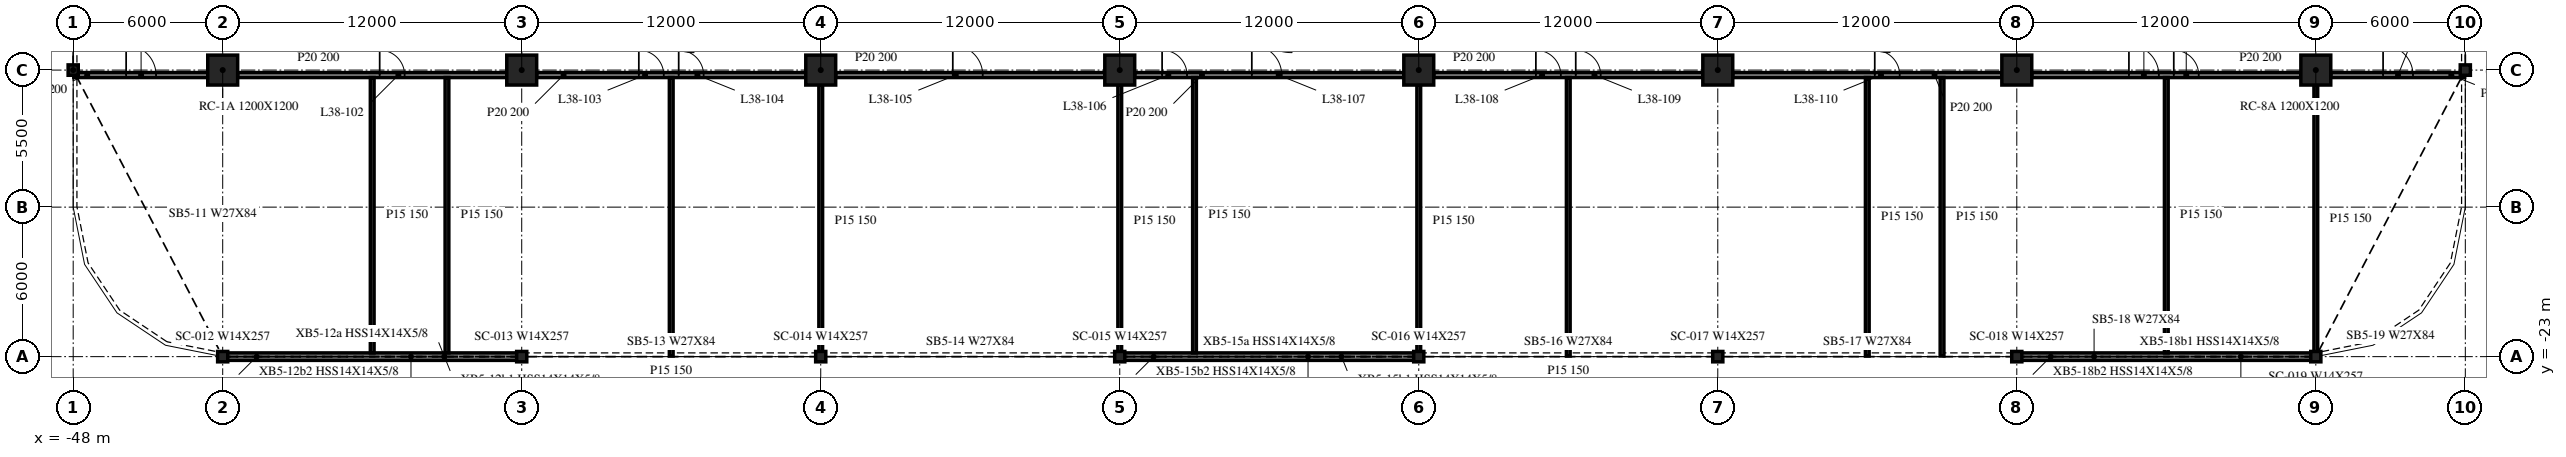
"""IFC4 building model, lengths in metres.
Left out: names, types, materials, properties, quantities, classifications, styles, units other than length and angle.
Written with IfcOpenShell. Run it as: python <this file> out.ifc"""

import sys

from ifc_helpers import new_model, si_unit, direction, frame, frame_2d, origin, origin_2d, place, context, subcontext, project, spatial, rectangle, i_section, extrude, element, fill, save


model = new_model("IFC4")
c1 = context("Model", 3, precision=1e-05, world=origin(), true_north=direction((0.0, 1.0)))
c2 = subcontext(c1, "Body", "Model", "MODEL_VIEW")
j1 = project(units=[si_unit("LENGTHUNIT", "METRE"), si_unit("PLANEANGLEUNIT", "RADIAN")], contexts=[c1])
p1 = place(None, origin())
s1 = spatial("IfcSite", under=j1, at=p1, CompositionType="ELEMENT")
p2 = place(p1, origin())
s2 = spatial("IfcBuilding", under=s1, at=p2, CompositionType="ELEMENT")
p3 = place(p2, frame((0.0, 0.0, 163.0)))
s3 = spatial("IfcBuildingStorey", under=s2, at=p3, CompositionType="ELEMENT", Elevation=163.0)
for number, where, z_axis, x_axis in (
    (1, (-42.0, -11.5, -0.34), (0.0, 0.0, 1.0), (1.0, 0.0, 0.0)),
    (2, (-30.0, -11.5, -0.34), (0.0, 0.0, 1.0), (1.0, 0.0, 0.0)),
    (3, (-18.0, -11.5, -0.34), (0.0, 0.0, 1.0), (1.0, 0.0, 0.0)),
    (4, (-6.0, -11.5, -0.34), (0.0, 0.0, 1.0), (1.0, 0.0, 0.0)),
    (5, (6.0, -11.5, -0.34), (0.0, 0.0, 1.0), (1.0, 0.0, 0.0)),
    (6, (18.0, -11.5, -0.34), (0.0, 0.0, 1.0), (1.0, 0.0, 0.0)),
    (7, (30.0, -11.5, -0.34), (0.0, 0.0, 1.0), (1.0, 0.0, 0.0)),
    (8, (42.0, -11.5, -0.34), (0.0, 0.0, 1.0), (1.0, 0.0, 0.0)),
):
    element("IfcColumn", number, at=place(p3, frame(where, z_axis=z_axis, x_axis=x_axis)), inside=s3, PredefinedType="COLUMN", context=c2, shape_type="SweptSolid", body=[
        extrude(rectangle(XDim=1.2, YDim=1.2, at=origin_2d()), origin(), (0.0, 0.0, 1.0), 3.8),
    ])
for number, where, z_axis, x_axis in (
    (9, (-48.0, -11.5, -0.34), (0.0, 0.0, 1.0), (1.0, 0.0, 0.0)),
    (10, (-42.0, -23.0, -0.34), (0.0, 0.0, 1.0), (1.0, 0.0, 0.0)),
    (11, (-30.0, -23.0, -0.34), (0.0, 0.0, 1.0), (1.0, 0.0, 0.0)),
    (12, (-18.0, -23.0, -0.34), (0.0, 0.0, 1.0), (1.0, 0.0, 0.0)),
    (13, (-6.0, -23.0, -0.34), (0.0, 0.0, 1.0), (1.0, 0.0, 0.0)),
    (14, (6.0, -23.0, -0.34), (0.0, 0.0, 1.0), (1.0, 0.0, 0.0)),
    (15, (18.0, -23.0, -0.34), (0.0, 0.0, 1.0), (1.0, 0.0, 0.0)),
    (16, (30.0, -23.0, -0.34), (0.0, 0.0, 1.0), (1.0, 0.0, 0.0)),
    (17, (42.0, -23.0, -0.34), (0.0, 0.0, 1.0), (1.0, 0.0, 0.0)),
    (18, (48.0, -11.5, -0.34), (0.0, 0.0, 1.0), (1.0, 0.0, 0.0)),
):
    element("IfcColumn", number, at=place(p3, frame(where, z_axis=z_axis, x_axis=x_axis)), inside=s3, PredefinedType="COLUMN", context=c2, shape_type="SweptSolid", body=[
        extrude(i_section(OverallWidth=0.406, OverallDepth=0.417, WebThickness=0.03, FlangeThickness=0.048, at=origin_2d()), origin(), (0.0, 0.0, 1.0), 3.8),
    ])
for number, where, z_axis, x_axis in (
    (19, (-41.985, -23.0, 0.0), (0.0, 0.0, 1.0), (1.0, 0.0, 0.0)),
    (20, (-5.985, -23.0, 0.0), (0.0, 0.0, 1.0), (1.0, 0.0, 0.0)),
    (21, (30.015, -23.0, 0.0), (0.0, 0.0, 1.0), (1.0, 0.0, 0.0)),
):
    element("IfcWall", number, at=place(p3, frame(where, z_axis=z_axis, x_axis=x_axis)), inside=s3, PredefinedType="NOTDEFINED", context=c2, shape_type="SweptSolid", body=[
        extrude(rectangle(XDim=11.97, YDim=0.3, at=frame_2d((5.985, 0.0))), origin(), (0.0, 0.0, 1.0), 2.782),
    ])
p4 = place(p3, frame((-47.975, -11.7, 0.0), z_axis=(0.0, 0.0, 1.0), x_axis=(1.0, 0.0, 0.0)))
e22 = element("IfcWall", 22, at=p4, inside=s3, PredefinedType="PARTITIONING", context=c2, shape_type="SweptSolid", body=[
    extrude(rectangle(XDim=5.375, YDim=0.2, at=frame_2d((2.688, 0.0))), origin(), (0.0, 0.0, 1.0), 3.46),
])
p5 = place(p4, frame((2.1, 0.0, 0.0)))
e23 = element("IfcOpeningElement", 23, at=p5, cuts=e22, PredefinedType="OPENING", context=c2, shape_type="SweptSolid", body=[
    extrude(rectangle(XDim=1.2, YDim=2.1, at=frame_2d((0.6, 1.05))), frame((0.0, 0.11, 0.0), z_axis=(0.0, -1.0, 0.0), x_axis=(1.0, 0.0, 0.0)), (0.0, 0.0, 1.0), 0.22),
])
p6 = place(p3, frame((-41.4, -11.7, 0.0), z_axis=(0.0, 0.0, 1.0), x_axis=(1.0, 0.0, 0.0)))
e24 = element("IfcWall", 24, at=p6, inside=s3, PredefinedType="PARTITIONING", context=c2, shape_type="SweptSolid", body=[
    extrude(rectangle(XDim=10.8, YDim=0.2, at=frame_2d((5.4, 0.0))), origin(), (0.0, 0.0, 1.0), 3.46),
])
p7 = place(p6, frame((5.7, 0.0, 0.0)))
e25 = element("IfcOpeningElement", 25, at=p7, cuts=e24, PredefinedType="OPENING", context=c2, shape_type="SweptSolid", body=[
    extrude(rectangle(XDim=1.0, YDim=2.1, at=frame_2d((0.5, 1.05))), frame((0.0, 0.11, 0.0), z_axis=(0.0, -1.0, 0.0), x_axis=(1.0, 0.0, 0.0)), (0.0, 0.0, 1.0), 0.22),
])
p8 = place(p3, frame((-29.4, -11.7, 0.0), z_axis=(0.0, 0.0, 1.0), x_axis=(1.0, 0.0, 0.0)))
e26 = element("IfcWall", 26, at=p8, inside=s3, PredefinedType="PARTITIONING", context=c2, shape_type="SweptSolid", body=[
    extrude(rectangle(XDim=10.8, YDim=0.2, at=frame_2d((5.4, 0.0))), origin(), (0.0, 0.0, 1.0), 3.46),
])
p9 = place(p8, frame((4.1, 0.0, 0.0)))
e27 = element("IfcOpeningElement", 27, at=p9, cuts=e26, PredefinedType="OPENING", context=c2, shape_type="SweptSolid", body=[
    extrude(rectangle(XDim=1.0, YDim=2.1, at=frame_2d((0.5, 1.05))), frame((0.0, 0.11, 0.0), z_axis=(0.0, -1.0, 0.0), x_axis=(1.0, 0.0, 0.0)), (0.0, 0.0, 1.0), 0.22),
])
p10 = place(p8, frame((5.7, 0.0, 0.0)))
e28 = element("IfcOpeningElement", 28, at=p10, cuts=e26, PredefinedType="OPENING", context=c2, shape_type="SweptSolid", body=[
    extrude(rectangle(XDim=1.0, YDim=2.1, at=frame_2d((0.5, 1.05))), frame((0.0, 0.11, 0.0), z_axis=(0.0, -1.0, 0.0), x_axis=(1.0, 0.0, 0.0)), (0.0, 0.0, 1.0), 0.22),
])
p11 = place(p3, frame((-17.4, -11.7, 0.0), z_axis=(0.0, 0.0, 1.0), x_axis=(1.0, 0.0, 0.0)))
e29 = element("IfcWall", 29, at=p11, inside=s3, PredefinedType="PARTITIONING", context=c2, shape_type="SweptSolid", body=[
    extrude(rectangle(XDim=10.8, YDim=0.2, at=frame_2d((5.4, 0.0))), origin(), (0.0, 0.0, 1.0), 3.46),
])
p12 = place(p11, frame((4.7, 0.0, 0.0)))
e30 = element("IfcOpeningElement", 30, at=p12, cuts=e29, PredefinedType="OPENING", context=c2, shape_type="SweptSolid", body=[
    extrude(rectangle(XDim=1.2, YDim=2.1, at=frame_2d((0.6, 1.05))), frame((0.0, 0.11, 0.0), z_axis=(0.0, -1.0, 0.0), x_axis=(1.0, 0.0, 0.0)), (0.0, 0.0, 1.0), 0.22),
])
p13 = place(p3, frame((-5.4, -11.7, 0.0), z_axis=(0.0, 0.0, 1.0), x_axis=(1.0, 0.0, 0.0)))
e31 = element("IfcWall", 31, at=p13, inside=s3, PredefinedType="PARTITIONING", context=c2, shape_type="SweptSolid", body=[
    extrude(rectangle(XDim=10.8, YDim=0.2, at=frame_2d((5.4, 0.0))), origin(), (0.0, 0.0, 1.0), 3.46),
])
p14 = place(p13, frame((1.1, 0.0, 0.0)))
e32 = element("IfcOpeningElement", 32, at=p14, cuts=e31, PredefinedType="OPENING", context=c2, shape_type="SweptSolid", body=[
    extrude(rectangle(XDim=1.0, YDim=2.1, at=frame_2d((0.5, 1.05))), frame((0.0, 0.11, 0.0), z_axis=(0.0, -1.0, 0.0), x_axis=(1.0, 0.0, 0.0)), (0.0, 0.0, 1.0), 0.22),
])
p15 = place(p13, frame((4.7, 0.0, 0.0)))
e33 = element("IfcOpeningElement", 33, at=p15, cuts=e31, PredefinedType="OPENING", context=c2, shape_type="SweptSolid", body=[
    extrude(rectangle(XDim=1.2, YDim=2.1, at=frame_2d((0.6, 1.05))), frame((0.0, 0.11, 0.0), z_axis=(0.0, -1.0, 0.0), x_axis=(1.0, 0.0, 0.0)), (0.0, 0.0, 1.0), 0.22),
])
p16 = place(p3, frame((6.6, -11.7, 0.0), z_axis=(0.0, 0.0, 1.0), x_axis=(1.0, 0.0, 0.0)))
e34 = element("IfcWall", 34, at=p16, inside=s3, PredefinedType="PARTITIONING", context=c2, shape_type="SweptSolid", body=[
    extrude(rectangle(XDim=10.8, YDim=0.2, at=frame_2d((5.4, 0.0))), origin(), (0.0, 0.0, 1.0), 3.46),
])
p17 = place(p16, frame((4.1, 0.0, 0.0)))
e35 = element("IfcOpeningElement", 35, at=p17, cuts=e34, PredefinedType="OPENING", context=c2, shape_type="SweptSolid", body=[
    extrude(rectangle(XDim=1.0, YDim=2.1, at=frame_2d((0.5, 1.05))), frame((0.0, 0.11, 0.0), z_axis=(0.0, -1.0, 0.0), x_axis=(1.0, 0.0, 0.0)), (0.0, 0.0, 1.0), 0.22),
])
p18 = place(p16, frame((5.7, 0.0, 0.0)))
e36 = element("IfcOpeningElement", 36, at=p18, cuts=e34, PredefinedType="OPENING", context=c2, shape_type="SweptSolid", body=[
    extrude(rectangle(XDim=1.0, YDim=2.1, at=frame_2d((0.5, 1.05))), frame((0.0, 0.11, 0.0), z_axis=(0.0, -1.0, 0.0), x_axis=(1.0, 0.0, 0.0)), (0.0, 0.0, 1.0), 0.22),
])
p19 = place(p3, frame((18.6, -11.7, 0.0), z_axis=(0.0, 0.0, 1.0), x_axis=(1.0, 0.0, 0.0)))
e37 = element("IfcWall", 37, at=p19, inside=s3, PredefinedType="PARTITIONING", context=c2, shape_type="SweptSolid", body=[
    extrude(rectangle(XDim=10.8, YDim=0.2, at=frame_2d((5.4, 0.0))), origin(), (0.0, 0.0, 1.0), 3.46),
])
p20 = place(p19, frame((5.7, 0.0, 0.0)))
e38 = element("IfcOpeningElement", 38, at=p20, cuts=e37, PredefinedType="OPENING", context=c2, shape_type="SweptSolid", body=[
    extrude(rectangle(XDim=1.0, YDim=2.1, at=frame_2d((0.5, 1.05))), frame((0.0, 0.11, 0.0), z_axis=(0.0, -1.0, 0.0), x_axis=(1.0, 0.0, 0.0)), (0.0, 0.0, 1.0), 0.22),
])
p21 = place(p3, frame((30.6, -11.7, 0.0), z_axis=(0.0, 0.0, 1.0), x_axis=(1.0, 0.0, 0.0)))
e39 = element("IfcWall", 39, at=p21, inside=s3, PredefinedType="PARTITIONING", context=c2, shape_type="SweptSolid", body=[
    extrude(rectangle(XDim=10.8, YDim=0.2, at=frame_2d((5.4, 0.0))), origin(), (0.0, 0.0, 1.0), 3.46),
])
p22 = place(p21, frame((3.9, 0.0, 0.0)))
e40 = element("IfcOpeningElement", 40, at=p22, cuts=e39, PredefinedType="OPENING", context=c2, shape_type="SweptSolid", body=[
    extrude(rectangle(XDim=1.2, YDim=2.1, at=frame_2d((0.6, 1.05))), frame((0.0, 0.11, 0.0), z_axis=(0.0, -1.0, 0.0), x_axis=(1.0, 0.0, 0.0)), (0.0, 0.0, 1.0), 0.22),
])
p23 = place(p21, frame((5.7, 0.0, 0.0)))
e41 = element("IfcOpeningElement", 41, at=p23, cuts=e39, PredefinedType="OPENING", context=c2, shape_type="SweptSolid", body=[
    extrude(rectangle(XDim=1.0, YDim=2.1, at=frame_2d((0.5, 1.05))), frame((0.0, 0.11, 0.0), z_axis=(0.0, -1.0, 0.0), x_axis=(1.0, 0.0, 0.0)), (0.0, 0.0, 1.0), 0.22),
])
p24 = place(p3, frame((42.6, -11.7, 0.0), z_axis=(0.0, 0.0, 1.0), x_axis=(1.0, 0.0, 0.0)))
e42 = element("IfcWall", 42, at=p24, inside=s3, PredefinedType="PARTITIONING", context=c2, shape_type="SweptSolid", body=[
    extrude(rectangle(XDim=5.375, YDim=0.2, at=frame_2d((2.688, 0.0))), origin(), (0.0, 0.0, 1.0), 3.46),
])
p25 = place(p24, frame((2.1, 0.0, 0.0)))
e43 = element("IfcOpeningElement", 43, at=p25, cuts=e42, PredefinedType="OPENING", context=c2, shape_type="SweptSolid", body=[
    extrude(rectangle(XDim=1.2, YDim=2.1, at=frame_2d((0.6, 1.05))), frame((0.0, 0.11, 0.0), z_axis=(0.0, -1.0, 0.0), x_axis=(1.0, 0.0, 0.0)), (0.0, 0.0, 1.0), 0.22),
])
for number, where, z_axis, x_axis in (
    (44, (-36.0, -22.85, 0.0), (0.0, 0.0, 1.0), (0.0, 1.0, 0.0)),
    (45, (-33.0, -22.85, 0.0), (0.0, 0.0, 1.0), (0.0, 1.0, 0.0)),
):
    element("IfcWall", number, at=place(p3, frame(where, z_axis=z_axis, x_axis=x_axis)), inside=s3, PredefinedType="PARTITIONING", context=c2, shape_type="SweptSolid", body=[
        extrude(rectangle(XDim=11.05, YDim=0.15, at=frame_2d((5.525, 0.0))), origin(), (0.0, 0.0, 1.0), 3.46),
    ])
p26 = place(p3, frame((-24.0, -22.975, 0.0), z_axis=(0.0, 0.0, 1.0), x_axis=(0.0, 1.0, 0.0)))
e46 = element("IfcWall", 46, at=p26, inside=s3, PredefinedType="PARTITIONING", context=c2, shape_type="SweptSolid", body=[
    extrude(rectangle(XDim=11.175, YDim=0.15, at=frame_2d((5.587, 0.0))), origin(), (0.0, 0.0, 1.0), 3.46),
])
for number, where, z_axis, x_axis in (
    (47, (-18.0, -22.975, 0.0), (0.0, 0.0, 1.0), (0.0, 1.0, 0.0)),
    (48, (-6.0, -22.975, 0.0), (0.0, 0.0, 1.0), (0.0, 1.0, 0.0)),
):
    element("IfcWall", number, at=place(p3, frame(where, z_axis=z_axis, x_axis=x_axis)), inside=s3, PredefinedType="PARTITIONING", context=c2, shape_type="SweptSolid", body=[
        extrude(rectangle(XDim=10.875, YDim=0.15, at=frame_2d((5.438, 0.0))), origin(), (0.0, 0.0, 1.0), 3.46),
    ])
p27 = place(p3, frame((-3.0, -22.85, 0.0), z_axis=(0.0, 0.0, 1.0), x_axis=(0.0, 1.0, 0.0)))
e49 = element("IfcWall", 49, at=p27, inside=s3, PredefinedType="PARTITIONING", context=c2, shape_type="SweptSolid", body=[
    extrude(rectangle(XDim=11.05, YDim=0.15, at=frame_2d((5.525, 0.0))), origin(), (0.0, 0.0, 1.0), 3.46),
])
p28 = place(p3, frame((6.0, -22.975, 0.0), z_axis=(0.0, 0.0, 1.0), x_axis=(0.0, 1.0, 0.0)))
e50 = element("IfcWall", 50, at=p28, inside=s3, PredefinedType="PARTITIONING", context=c2, shape_type="SweptSolid", body=[
    extrude(rectangle(XDim=10.875, YDim=0.15, at=frame_2d((5.438, 0.0))), origin(), (0.0, 0.0, 1.0), 3.46),
])
for number, where, z_axis, x_axis in (
    (51, (12.0, -22.975, 0.0), (0.0, 0.0, 1.0), (0.0, 1.0, 0.0)),
    (52, (24.0, -22.975, 0.0), (0.0, 0.0, 1.0), (0.0, 1.0, 0.0)),
    (53, (27.0, -22.975, 0.0), (0.0, 0.0, 1.0), (0.0, 1.0, 0.0)),
):
    element("IfcWall", number, at=place(p3, frame(where, z_axis=z_axis, x_axis=x_axis)), inside=s3, PredefinedType="PARTITIONING", context=c2, shape_type="SweptSolid", body=[
        extrude(rectangle(XDim=11.175, YDim=0.15, at=frame_2d((5.587, 0.0))), origin(), (0.0, 0.0, 1.0), 3.46),
    ])
p29 = place(p3, frame((36.0, -22.85, 0.0), z_axis=(0.0, 0.0, 1.0), x_axis=(0.0, 1.0, 0.0)))
e54 = element("IfcWall", 54, at=p29, inside=s3, PredefinedType="PARTITIONING", context=c2, shape_type="SweptSolid", body=[
    extrude(rectangle(XDim=11.05, YDim=0.15, at=frame_2d((5.525, 0.0))), origin(), (0.0, 0.0, 1.0), 3.46),
])
p30 = place(p3, frame((42.0, -22.847, 0.0), z_axis=(0.0, 0.0, 1.0), x_axis=(0.0, 1.0, 0.0)))
e55 = element("IfcWall", 55, at=p30, inside=s3, PredefinedType="PARTITIONING", context=c2, shape_type="SweptSolid", body=[
    extrude(rectangle(XDim=10.747, YDim=0.15, at=frame_2d((5.374, 0.0))), origin(), (0.0, 0.0, 1.0), 3.46),
])
p31 = place(p5, origin())
e56 = element("IfcDoor", 56, at=p31, inside=s3, OperationType="SINGLE_SWING_LEFT", PredefinedType="DOOR", context=c2, shape_type="SweptSolid", body=[
    extrude(rectangle(XDim=1.2, YDim=2.1, at=frame_2d((0.6, 1.05))), frame((0.0, 0.025, 0.0), z_axis=(0.0, -1.0, 0.0), x_axis=(1.0, 0.0, 0.0)), (0.0, 0.0, 1.0), 0.05),
])
fill(e23, e56)
p32 = place(p7, origin())
e57 = element("IfcDoor", 57, at=p32, inside=s3, OperationType="SINGLE_SWING_LEFT", PredefinedType="DOOR", context=c2, shape_type="SweptSolid", body=[
    extrude(rectangle(XDim=1.0, YDim=2.1, at=frame_2d((0.5, 1.05))), frame((0.0, 0.025, 0.0), z_axis=(0.0, -1.0, 0.0), x_axis=(1.0, 0.0, 0.0)), (0.0, 0.0, 1.0), 0.05),
])
fill(e25, e57)
p33 = place(p9, origin())
e58 = element("IfcDoor", 58, at=p33, inside=s3, OperationType="SINGLE_SWING_RIGHT", PredefinedType="DOOR", context=c2, shape_type="SweptSolid", body=[
    extrude(rectangle(XDim=1.0, YDim=2.1, at=frame_2d((0.5, 1.05))), frame((0.0, 0.025, 0.0), z_axis=(0.0, -1.0, 0.0), x_axis=(1.0, 0.0, 0.0)), (0.0, 0.0, 1.0), 0.05),
])
fill(e27, e58)
p34 = place(p10, origin())
e59 = element("IfcDoor", 59, at=p34, inside=s3, OperationType="SINGLE_SWING_LEFT", PredefinedType="DOOR", context=c2, shape_type="SweptSolid", body=[
    extrude(rectangle(XDim=1.0, YDim=2.1, at=frame_2d((0.5, 1.05))), frame((0.0, 0.025, 0.0), z_axis=(0.0, -1.0, 0.0), x_axis=(1.0, 0.0, 0.0)), (0.0, 0.0, 1.0), 0.05),
])
fill(e28, e59)
p35 = place(p12, origin())
e60 = element("IfcDoor", 60, at=p35, inside=s3, OperationType="SINGLE_SWING_RIGHT", PredefinedType="DOOR", context=c2, shape_type="SweptSolid", body=[
    extrude(rectangle(XDim=1.2, YDim=2.1, at=frame_2d((0.6, 1.05))), frame((0.0, 0.025, 0.0), z_axis=(0.0, -1.0, 0.0), x_axis=(1.0, 0.0, 0.0)), (0.0, 0.0, 1.0), 0.05),
])
fill(e30, e60)
p36 = place(p14, origin())
e61 = element("IfcDoor", 61, at=p36, inside=s3, OperationType="SINGLE_SWING_RIGHT", PredefinedType="DOOR", context=c2, shape_type="SweptSolid", body=[
    extrude(rectangle(XDim=1.0, YDim=2.1, at=frame_2d((0.5, 1.05))), frame((0.0, 0.025, 0.0), z_axis=(0.0, -1.0, 0.0), x_axis=(1.0, 0.0, 0.0)), (0.0, 0.0, 1.0), 0.05),
])
fill(e32, e61)
p37 = place(p15, origin())
e62 = element("IfcDoor", 62, at=p37, inside=s3, OperationType="SINGLE_SWING_RIGHT", PredefinedType="DOOR", context=c2, shape_type="SweptSolid", body=[
    extrude(rectangle(XDim=1.2, YDim=2.1, at=frame_2d((0.6, 1.05))), frame((0.0, 0.025, 0.0), z_axis=(0.0, -1.0, 0.0), x_axis=(1.0, 0.0, 0.0)), (0.0, 0.0, 1.0), 0.05),
])
fill(e33, e62)
p38 = place(p17, origin())
e63 = element("IfcDoor", 63, at=p38, inside=s3, OperationType="SINGLE_SWING_RIGHT", PredefinedType="DOOR", context=c2, shape_type="SweptSolid", body=[
    extrude(rectangle(XDim=1.0, YDim=2.1, at=frame_2d((0.5, 1.05))), frame((0.0, 0.025, 0.0), z_axis=(0.0, -1.0, 0.0), x_axis=(1.0, 0.0, 0.0)), (0.0, 0.0, 1.0), 0.05),
])
fill(e35, e63)
p39 = place(p18, origin())
e64 = element("IfcDoor", 64, at=p39, inside=s3, OperationType="SINGLE_SWING_LEFT", PredefinedType="DOOR", context=c2, shape_type="SweptSolid", body=[
    extrude(rectangle(XDim=1.0, YDim=2.1, at=frame_2d((0.5, 1.05))), frame((0.0, 0.025, 0.0), z_axis=(0.0, -1.0, 0.0), x_axis=(1.0, 0.0, 0.0)), (0.0, 0.0, 1.0), 0.05),
])
fill(e36, e64)
p40 = place(p20, origin())
e65 = element("IfcDoor", 65, at=p40, inside=s3, OperationType="SINGLE_SWING_LEFT", PredefinedType="DOOR", context=c2, shape_type="SweptSolid", body=[
    extrude(rectangle(XDim=1.0, YDim=2.1, at=frame_2d((0.5, 1.05))), frame((0.0, 0.025, 0.0), z_axis=(0.0, -1.0, 0.0), x_axis=(1.0, 0.0, 0.0)), (0.0, 0.0, 1.0), 0.05),
])
fill(e38, e65)
p41 = place(p22, origin())
e66 = element("IfcDoor", 66, at=p41, inside=s3, OperationType="SINGLE_SWING_RIGHT", PredefinedType="DOOR", context=c2, shape_type="SweptSolid", body=[
    extrude(rectangle(XDim=1.2, YDim=2.1, at=frame_2d((0.6, 1.05))), frame((0.0, 0.025, 0.0), z_axis=(0.0, -1.0, 0.0), x_axis=(1.0, 0.0, 0.0)), (0.0, 0.0, 1.0), 0.05),
])
fill(e40, e66)
p42 = place(p23, origin())
e67 = element("IfcDoor", 67, at=p42, inside=s3, OperationType="SINGLE_SWING_LEFT", PredefinedType="DOOR", context=c2, shape_type="SweptSolid", body=[
    extrude(rectangle(XDim=1.0, YDim=2.1, at=frame_2d((0.5, 1.05))), frame((0.0, 0.025, 0.0), z_axis=(0.0, -1.0, 0.0), x_axis=(1.0, 0.0, 0.0)), (0.0, 0.0, 1.0), 0.05),
])
fill(e41, e67)
p43 = place(p25, origin())
e68 = element("IfcDoor", 68, at=p43, inside=s3, OperationType="SINGLE_SWING_LEFT", PredefinedType="DOOR", context=c2, shape_type="SweptSolid", body=[
    extrude(rectangle(XDim=1.2, YDim=2.1, at=frame_2d((0.6, 1.05))), frame((0.0, 0.025, 0.0), z_axis=(0.0, -1.0, 0.0), x_axis=(1.0, 0.0, 0.0)), (0.0, 0.0, 1.0), 0.05),
])
fill(e43, e68)
save(model, sys.argv[1])
